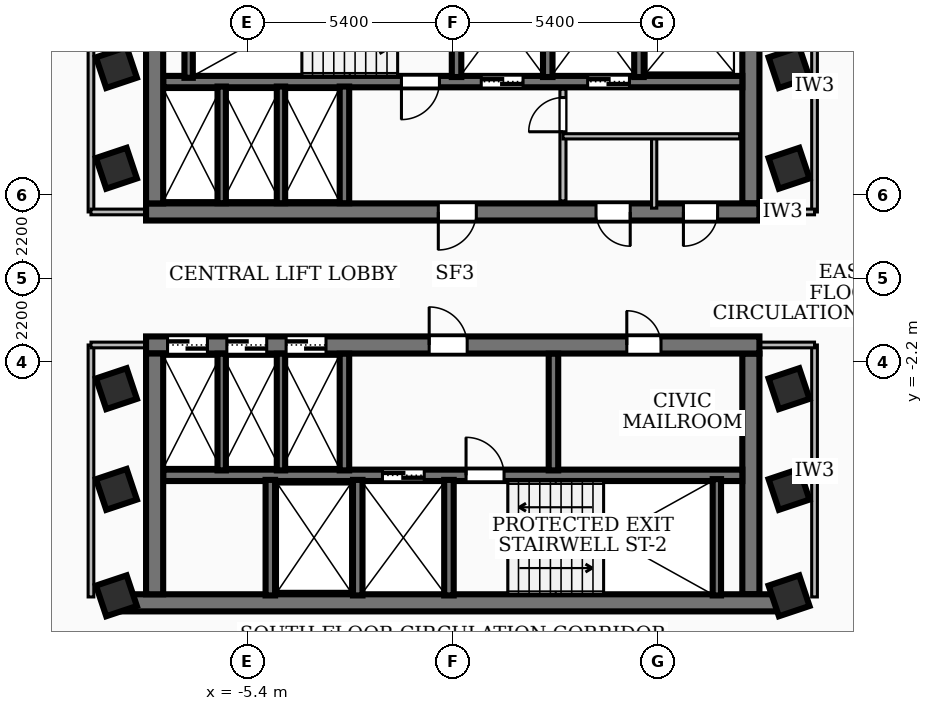
"""IFC4 building model, lengths in metres.
Left out: names, types, materials, properties, quantities, classifications, styles, units other than length and angle.
Written with IfcOpenShell. Run it as: python <this file> out.ifc"""

import sys

from ifc_helpers import new_model, si_unit, direction, frame, frame_2d, origin, origin_2d, place, context, subcontext, project, spatial, rectangle, extrude, element, fill, save


model = new_model("IFC4")
c1 = context("Model", 3, precision=1e-05, world=origin(), true_north=direction((0.0, 1.0)))
c2 = subcontext(c1, "Body", "Model", "MODEL_VIEW")
j1 = project(units=[si_unit("LENGTHUNIT", "METRE"), si_unit("PLANEANGLEUNIT", "RADIAN")], contexts=[c1])
p1 = place(None, origin())
s1 = spatial("IfcSite", under=j1, at=p1, CompositionType="ELEMENT")
p2 = place(p1, origin())
s2 = spatial("IfcBuilding", under=s1, at=p2, CompositionType="ELEMENT")
p3 = place(p2, frame((0.0, 0.0, 163.08)))
s3 = spatial("IfcBuildingStorey", under=s2, at=p3, CompositionType="ELEMENT", Elevation=163.08)
p4 = place(p3, frame((8.07, 1.75, 0.0), z_axis=(0.0, 0.0, 1.0), x_axis=(-1.0, 0.0, 0.0)))
e1 = element("IfcWall", 1, at=p4, inside=s3, PredefinedType="SHEAR", context=c2, shape_type="SweptSolid", body=[
    extrude(rectangle(XDim=16.14, YDim=0.45, at=frame_2d((8.07, 0.0))), origin(), (0.0, 0.0, 1.0), 3.34),
])
p5 = place(p4, frame((7.45, 0.0, 0.0)))
e2 = element("IfcOpeningElement", 2, at=p5, cuts=e1, PredefinedType="OPENING", context=c2, shape_type="SweptSolid", body=[
    extrude(rectangle(XDim=1.0, YDim=2.1, at=frame_2d((0.5, 1.05))), frame((0.0, 0.235, 0.0), z_axis=(0.0, -1.0, 0.0), x_axis=(1.0, 0.0, 0.0)), (0.0, 0.0, 1.0), 0.47),
])
p6 = place(p4, frame((3.4, 0.0, 0.0)))
e3 = element("IfcOpeningElement", 3, at=p6, cuts=e1, PredefinedType="OPENING", context=c2, shape_type="SweptSolid", body=[
    extrude(rectangle(XDim=0.9, YDim=2.06, at=frame_2d((0.45, 1.03))), frame((0.0, 0.235, 0.0), z_axis=(0.0, -1.0, 0.0), x_axis=(1.0, 0.0, 0.0)), (0.0, 0.0, 1.0), 0.47),
])
p7 = place(p4, frame((1.1, 0.0, 0.0)))
e4 = element("IfcOpeningElement", 4, at=p7, cuts=e1, PredefinedType="OPENING", context=c2, shape_type="SweptSolid", body=[
    extrude(rectangle(XDim=0.9, YDim=2.06, at=frame_2d((0.45, 1.03))), frame((0.0, 0.235, 0.0), z_axis=(0.0, -1.0, 0.0), x_axis=(1.0, 0.0, 0.0)), (0.0, 0.0, 1.0), 0.47),
])
for number, where, z_axis, x_axis in (
    (5, (-7.845, 1.975, 0.0), (0.0, 0.0, 1.0), (0.0, 1.0, 0.0)),
    (6, (7.845, 8.31, 0.0), (0.0, 0.0, 1.0), (0.0, -1.0, 0.0)),
):
    element("IfcWall", number, at=place(p3, frame(where, z_axis=z_axis, x_axis=x_axis)), inside=s3, PredefinedType="SHEAR", context=c2, shape_type="SweptSolid", body=[
        extrude(rectangle(XDim=6.335, YDim=0.45, at=frame_2d((3.167, 0.0))), origin(), (0.0, 0.0, 1.0), 3.34),
    ])
p8 = place(p3, frame((7.62, 5.18, 0.0), z_axis=(0.0, 0.0, 1.0), x_axis=(-1.0, 0.0, 0.0)))
e7 = element("IfcWall", 7, at=p8, inside=s3, PredefinedType="SOLIDWALL", context=c2, shape_type="SweptSolid", body=[
    extrude(rectangle(XDim=15.24, YDim=0.3, at=frame_2d((7.62, 0.0))), origin(), (0.0, 0.0, 1.0), 3.34),
])
p9 = place(p8, frame((5.77, 0.0, 0.0)))
e8 = element("IfcOpeningElement", 8, at=p9, cuts=e7, PredefinedType="OPENING", context=c2, shape_type="SweptSolid", body=[
    extrude(rectangle(XDim=1.1, YDim=2.15, at=frame_2d((0.55, 1.075))), frame((0.0, 0.16, 0.0), z_axis=(0.0, -1.0, 0.0), x_axis=(1.0, 0.0, 0.0)), (0.0, 0.0, 1.0), 0.32),
])
p10 = place(p8, frame((2.97, 0.0, 0.0)))
e9 = element("IfcOpeningElement", 9, at=p10, cuts=e7, PredefinedType="OPENING", context=c2, shape_type="SweptSolid", body=[
    extrude(rectangle(XDim=1.1, YDim=2.15, at=frame_2d((0.55, 1.075))), frame((0.0, 0.16, 0.0), z_axis=(0.0, -1.0, 0.0), x_axis=(1.0, 0.0, 0.0)), (0.0, 0.0, 1.0), 0.32),
])
p11 = place(p8, frame((7.97, 0.0, 0.0)))
e10 = element("IfcOpeningElement", 10, at=p11, cuts=e7, PredefinedType="OPENING", context=c2, shape_type="SweptSolid", body=[
    extrude(rectangle(XDim=1.0, YDim=2.1, at=frame_2d((0.5, 1.05))), frame((0.0, 0.16, 0.0), z_axis=(0.0, -1.0, 0.0), x_axis=(1.0, 0.0, 0.0)), (0.0, 0.0, 1.0), 0.32),
])
p12 = place(p3, frame((8.78, -8.535, 0.0), z_axis=(0.0, 0.0, 1.0), x_axis=(-1.0, 0.0, 0.0)))
e11 = element("IfcWall", 11, at=p12, inside=s3, PredefinedType="SHEAR", context=c2, shape_type="SweptSolid", body=[
    extrude(rectangle(XDim=17.56, YDim=0.45, at=frame_2d((8.78, 0.0))), origin(), (0.0, 0.0, 1.0), 3.34),
])
p13 = place(p3, frame((-8.07, -1.75, 0.0), z_axis=(0.0, 0.0, 1.0), x_axis=(1.0, 0.0, 0.0)))
e12 = element("IfcWall", 12, at=p13, inside=s3, PredefinedType="SHEAR", context=c2, shape_type="SweptSolid", body=[
    extrude(rectangle(XDim=16.14, YDim=0.45, at=frame_2d((8.07, 0.0))), origin(), (0.0, 0.0, 1.0), 3.34),
])
p14 = place(p13, frame((7.45, 0.0, 0.0)))
e13 = element("IfcOpeningElement", 13, at=p14, cuts=e12, PredefinedType="OPENING", context=c2, shape_type="SweptSolid", body=[
    extrude(rectangle(XDim=1.0, YDim=2.1, at=frame_2d((0.5, 1.05))), frame((0.0, 0.235, 0.0), z_axis=(0.0, -1.0, 0.0), x_axis=(1.0, 0.0, 0.0)), (0.0, 0.0, 1.0), 0.47),
])
p15 = place(p13, frame((12.65, 0.0, 0.0)))
e14 = element("IfcOpeningElement", 14, at=p15, cuts=e12, PredefinedType="OPENING", context=c2, shape_type="SweptSolid", body=[
    extrude(rectangle(XDim=0.9, YDim=2.06, at=frame_2d((0.45, 1.03))), frame((0.0, 0.235, 0.0), z_axis=(0.0, -1.0, 0.0), x_axis=(1.0, 0.0, 0.0)), (0.0, 0.0, 1.0), 0.47),
])
p16 = place(p13, frame((0.565, 0.0, 0.0)))
e15 = element("IfcOpeningElement", 15, at=p16, cuts=e12, PredefinedType="OPENING", context=c2, shape_type="SweptSolid", body=[
    extrude(rectangle(XDim=1.05, YDim=2.15, at=frame_2d((0.525, 1.075))), frame((0.0, 0.235, 0.0), z_axis=(0.0, -1.0, 0.0), x_axis=(1.0, 0.0, 0.0)), (0.0, 0.0, 1.0), 0.47),
])
p17 = place(p13, frame((2.125, 0.0, 0.0)))
e16 = element("IfcOpeningElement", 16, at=p17, cuts=e12, PredefinedType="OPENING", context=c2, shape_type="SweptSolid", body=[
    extrude(rectangle(XDim=1.05, YDim=2.15, at=frame_2d((0.525, 1.075))), frame((0.0, 0.235, 0.0), z_axis=(0.0, -1.0, 0.0), x_axis=(1.0, 0.0, 0.0)), (0.0, 0.0, 1.0), 0.47),
])
p18 = place(p13, frame((3.685, 0.0, 0.0)))
e17 = element("IfcOpeningElement", 17, at=p18, cuts=e12, PredefinedType="OPENING", context=c2, shape_type="SweptSolid", body=[
    extrude(rectangle(XDim=1.05, YDim=2.15, at=frame_2d((0.525, 1.075))), frame((0.0, 0.235, 0.0), z_axis=(0.0, -1.0, 0.0), x_axis=(1.0, 0.0, 0.0)), (0.0, 0.0, 1.0), 0.47),
])
for number, where, z_axis, x_axis in (
    (18, (-7.845, -8.31, 0.0), (0.0, 0.0, 1.0), (0.0, 1.0, 0.0)),
    (19, (7.845, -1.975, 0.0), (0.0, 0.0, 1.0), (0.0, -1.0, 0.0)),
):
    element("IfcWall", number, at=place(p3, frame(where, z_axis=z_axis, x_axis=x_axis)), inside=s3, PredefinedType="SHEAR", context=c2, shape_type="SweptSolid", body=[
        extrude(rectangle(XDim=6.335, YDim=0.45, at=frame_2d((3.167, 0.0))), origin(), (0.0, 0.0, 1.0), 3.34),
    ])
p19 = place(p3, frame((-7.62, -5.18, 0.0), z_axis=(0.0, 0.0, 1.0), x_axis=(1.0, 0.0, 0.0)))
e20 = element("IfcWall", 20, at=p19, inside=s3, PredefinedType="SOLIDWALL", context=c2, shape_type="SweptSolid", body=[
    extrude(rectangle(XDim=15.24, YDim=0.3, at=frame_2d((7.62, 0.0))), origin(), (0.0, 0.0, 1.0), 3.34),
])
p20 = place(p19, frame((5.77, 0.0, 0.0)))
e21 = element("IfcOpeningElement", 21, at=p20, cuts=e20, PredefinedType="OPENING", context=c2, shape_type="SweptSolid", body=[
    extrude(rectangle(XDim=1.1, YDim=2.15, at=frame_2d((0.55, 1.075))), frame((0.0, 0.16, 0.0), z_axis=(0.0, -1.0, 0.0), x_axis=(1.0, 0.0, 0.0)), (0.0, 0.0, 1.0), 0.32),
])
p21 = place(p19, frame((7.97, 0.0, 0.0)))
e22 = element("IfcOpeningElement", 22, at=p21, cuts=e20, PredefinedType="OPENING", context=c2, shape_type="SweptSolid", body=[
    extrude(rectangle(XDim=1.0, YDim=2.1, at=frame_2d((0.5, 1.05))), frame((0.0, 0.16, 0.0), z_axis=(0.0, -1.0, 0.0), x_axis=(1.0, 0.0, 0.0)), (0.0, 0.0, 1.0), 0.32),
])
for number, where, z_axis, x_axis in (
    (23, (-6.95, 5.28, 0.0), (0.0, 0.0, 1.0), (0.0, 1.0, 0.0)),
    (24, (6.95, -8.34, 0.0), (0.0, 0.0, 1.0), (0.0, 1.0, 0.0)),
):
    element("IfcWall", number, at=place(p3, frame(where, z_axis=z_axis, x_axis=x_axis)), inside=s3, PredefinedType="SOLIDWALL", context=c2, shape_type="SweptSolid", body=[
        extrude(rectangle(XDim=3.06, YDim=0.22, at=frame_2d((1.53, 0.0))), origin(), (0.0, 0.0, 1.0), 3.34),
    ])
for number, where, z_axis, x_axis in (
    (25, (0.1, 5.3, 0.0), (0.0, 0.0, 1.0), (0.0, 1.0, 0.0)),
    (26, (2.5, 5.3, 0.0), (0.0, 0.0, 1.0), (0.0, 1.0, 0.0)),
    (27, (4.9, 5.3, 0.0), (0.0, 0.0, 1.0), (0.0, 1.0, 0.0)),
):
    element("IfcWall", number, at=place(p3, frame(where, z_axis=z_axis, x_axis=x_axis)), inside=s3, PredefinedType="SOLIDWALL", context=c2, shape_type="SweptSolid", body=[
        extrude(rectangle(XDim=3.04, YDim=0.25, at=frame_2d((1.52, 0.0))), origin(), (0.0, 0.0, 1.0), 3.34),
    ])
p22 = place(p3, frame((-2.85, 1.98, 0.0), z_axis=(0.0, 0.0, 1.0), x_axis=(0.0, 1.0, 0.0)))
e28 = element("IfcWall", 28, at=p22, inside=s3, PredefinedType="SOLIDWALL", context=c2, shape_type="SweptSolid", body=[
    extrude(rectangle(XDim=3.07, YDim=0.25, at=frame_2d((1.535, 0.0))), origin(), (0.0, 0.0, 1.0), 3.34),
])
for number, where, z_axis, x_axis in (
    (29, (-0.1, -8.34, 0.0), (0.0, 0.0, 1.0), (0.0, 1.0, 0.0)),
    (30, (-2.5, -8.34, 0.0), (0.0, 0.0, 1.0), (0.0, 1.0, 0.0)),
    (31, (-4.8, -8.34, 0.0), (0.0, 0.0, 1.0), (0.0, 1.0, 0.0)),
):
    element("IfcWall", number, at=place(p3, frame(where, z_axis=z_axis, x_axis=x_axis)), inside=s3, PredefinedType="SOLIDWALL", context=c2, shape_type="SweptSolid", body=[
        extrude(rectangle(XDim=3.04, YDim=0.25, at=frame_2d((1.52, 0.0))), origin(), (0.0, 0.0, 1.0), 3.34),
    ])
for number, where, z_axis, x_axis in (
    (32, (-2.85, -5.05, 0.0), (0.0, 0.0, 1.0), (0.0, 1.0, 0.0)),
    (33, (2.65, -5.05, 0.0), (0.0, 0.0, 1.0), (0.0, 1.0, 0.0)),
):
    element("IfcWall", number, at=place(p3, frame(where, z_axis=z_axis, x_axis=x_axis)), inside=s3, PredefinedType="SOLIDWALL", context=c2, shape_type="SweptSolid", body=[
        extrude(rectangle(XDim=3.07, YDim=0.25, at=frame_2d((1.535, 0.0))), origin(), (0.0, 0.0, 1.0), 3.34),
    ])
for number, where, z_axis, x_axis in (
    (34, (-6.08, 1.98, 0.0), (0.0, 0.0, 1.0), (0.0, 1.0, 0.0)),
    (35, (-4.52, 1.98, 0.0), (0.0, 0.0, 1.0), (0.0, 1.0, 0.0)),
    (36, (-6.08, -5.05, 0.0), (0.0, 0.0, 1.0), (0.0, 1.0, 0.0)),
    (37, (-4.52, -5.05, 0.0), (0.0, 0.0, 1.0), (0.0, 1.0, 0.0)),
):
    element("IfcWall", number, at=place(p3, frame(where, z_axis=z_axis, x_axis=x_axis)), inside=s3, PredefinedType="SOLIDWALL", context=c2, shape_type="SweptSolid", body=[
        extrude(rectangle(XDim=3.07, YDim=0.22, at=frame_2d((1.535, 0.0))), origin(), (0.0, 0.0, 1.0), 3.34),
    ])
for number, where, z_axis, x_axis in (
    (38, (-8.85, -5.55, 0.0), (0.0, 0.0, 1.0), (0.948, 0.317, 0.0)),
    (39, (-8.85, -2.9, 0.0), (0.0, 0.0, 1.0), (0.948, 0.317, 0.0)),
    (40, (-8.85, 2.9, 0.0), (0.0, 0.0, 1.0), (0.948, 0.317, 0.0)),
    (41, (-8.85, 5.55, 0.0), (0.0, 0.0, 1.0), (0.948, 0.317, 0.0)),
    (42, (8.85, -5.55, 0.0), (0.0, 0.0, 1.0), (0.948, 0.317, 0.0)),
    (43, (8.85, -2.9, 0.0), (0.0, 0.0, 1.0), (0.948, 0.317, 0.0)),
    (44, (8.85, 2.9, 0.0), (0.0, 0.0, 1.0), (0.948, 0.317, 0.0)),
    (45, (8.85, 5.55, 0.0), (0.0, 0.0, 1.0), (0.948, 0.317, 0.0)),
    (46, (8.85, -8.35, 0.0), (0.0, 0.0, 1.0), (0.948, 0.317, 0.0)),
    (47, (-8.85, -8.35, 0.0), (0.0, 0.0, 1.0), (0.948, 0.317, 0.0)),
):
    element("IfcColumn", number, at=place(p3, frame(where, z_axis=z_axis, x_axis=x_axis)), inside=s3, PredefinedType="COLUMN", context=c2, shape_type="SweptSolid", body=[
        extrude(rectangle(XDim=0.85, YDim=0.85, at=origin_2d()), origin(), (0.0, 0.0, 1.0), 3.6),
    ])
p23 = place(p3, frame((2.9, 2.04, 0.0), z_axis=(0.0, 0.0, 1.0), x_axis=(0.0, 1.0, 0.0)))
e48 = element("IfcWall", 48, at=p23, inside=s3, PredefinedType="PARTITIONING", context=c2, shape_type="SweptSolid", body=[
    extrude(rectangle(XDim=2.94, YDim=0.16, at=frame_2d((1.47, 0.0))), origin(), (0.0, 0.0, 1.0), 2.57),
])
p24 = place(p23, frame((1.82, 0.0, 0.0)))
e49 = element("IfcOpeningElement", 49, at=p24, cuts=e48, PredefinedType="OPENING", context=c2, shape_type="SweptSolid", body=[
    extrude(rectangle(XDim=0.9, YDim=2.06, at=frame_2d((0.45, 1.03))), frame((0.0, 0.09, 0.0), z_axis=(0.0, -1.0, 0.0), x_axis=(1.0, 0.0, 0.0)), (0.0, 0.0, 1.0), 0.18),
])
p25 = place(p3, frame((2.9, 3.74, 0.0), z_axis=(0.0, 0.0, 1.0), x_axis=(1.0, 0.0, 0.0)))
e50 = element("IfcWall", 50, at=p25, inside=s3, PredefinedType="PARTITIONING", context=c2, shape_type="SweptSolid", body=[
    extrude(rectangle(XDim=4.65, YDim=0.138, at=frame_2d((2.325, 0.0))), origin(), (0.0, 0.0, 1.0), 3.34),
])
p26 = place(p3, frame((5.3, 1.85, 0.0), z_axis=(0.0, 0.0, 1.0), x_axis=(0.0, 1.0, 0.0)))
e51 = element("IfcWall", 51, at=p26, inside=s3, PredefinedType="PARTITIONING", context=c2, shape_type="SweptSolid", body=[
    extrude(rectangle(XDim=1.89, YDim=0.138, at=frame_2d((0.945, 0.0))), origin(), (0.0, 0.0, 1.0), 2.57),
])
p27 = place(p3, frame((-9.52, 1.75, 0.0), z_axis=(0.0, 0.0, 1.0), x_axis=(0.0, 1.0, 0.0)))
e52 = element("IfcWall", 52, at=p27, inside=s3, PredefinedType="PARTITIONING", context=c2, shape_type="SweptSolid", body=[
    extrude(rectangle(XDim=6.63, YDim=0.15, at=frame_2d((3.315, 0.0))), origin(), (0.0, 0.0, 1.0), 3.34),
])
p28 = place(p3, frame((-7.85, 1.75, 0.0), z_axis=(0.0, 0.0, 1.0), x_axis=(-1.0, 0.0, 0.0)))
e53 = element("IfcWall", 53, at=p28, inside=s3, PredefinedType="PARTITIONING", context=c2, shape_type="SweptSolid", body=[
    extrude(rectangle(XDim=1.67, YDim=0.15, at=frame_2d((0.835, 0.0))), origin(), (0.0, 0.0, 1.0), 2.57),
])
p29 = place(p3, frame((-9.52, -8.38, 0.0), z_axis=(0.0, 0.0, 1.0), x_axis=(0.0, 1.0, 0.0)))
e54 = element("IfcWall", 54, at=p29, inside=s3, PredefinedType="PARTITIONING", context=c2, shape_type="SweptSolid", body=[
    extrude(rectangle(XDim=6.63, YDim=0.15, at=frame_2d((3.315, 0.0))), origin(), (0.0, 0.0, 1.0), 2.644),
])
p30 = place(p3, frame((-7.85, -1.75, 0.0), z_axis=(0.0, 0.0, 1.0), x_axis=(-1.0, 0.0, 0.0)))
e55 = element("IfcWall", 55, at=p30, inside=s3, PredefinedType="PARTITIONING", context=c2, shape_type="SweptSolid", body=[
    extrude(rectangle(XDim=1.67, YDim=0.15, at=frame_2d((0.835, 0.0))), origin(), (0.0, 0.0, 1.0), 2.57),
])
p31 = place(p3, frame((9.52, 1.75, 0.0), z_axis=(0.0, 0.0, 1.0), x_axis=(0.0, 1.0, 0.0)))
e56 = element("IfcWall", 56, at=p31, inside=s3, PredefinedType="PARTITIONING", context=c2, shape_type="SweptSolid", body=[
    extrude(rectangle(XDim=6.63, YDim=0.15, at=frame_2d((3.315, 0.0))), origin(), (0.0, 0.0, 1.0), 2.644),
])
p32 = place(p3, frame((7.85, 1.75, 0.0), z_axis=(0.0, 0.0, 1.0), x_axis=(1.0, 0.0, 0.0)))
e57 = element("IfcWall", 57, at=p32, inside=s3, PredefinedType="PARTITIONING", context=c2, shape_type="SweptSolid", body=[
    extrude(rectangle(XDim=1.67, YDim=0.15, at=frame_2d((0.835, 0.0))), origin(), (0.0, 0.0, 1.0), 2.57),
])
p33 = place(p3, frame((9.52, -8.38, 0.0), z_axis=(0.0, 0.0, 1.0), x_axis=(0.0, 1.0, 0.0)))
e58 = element("IfcWall", 58, at=p33, inside=s3, PredefinedType="PARTITIONING", context=c2, shape_type="SweptSolid", body=[
    extrude(rectangle(XDim=6.63, YDim=0.15, at=frame_2d((3.315, 0.0))), origin(), (0.0, 0.0, 1.0), 3.34),
])
p34 = place(p3, frame((7.85, -1.75, 0.0), z_axis=(0.0, 0.0, 1.0), x_axis=(1.0, 0.0, 0.0)))
e59 = element("IfcWall", 59, at=p34, inside=s3, PredefinedType="PARTITIONING", context=c2, shape_type="SweptSolid", body=[
    extrude(rectangle(XDim=1.67, YDim=0.15, at=frame_2d((0.835, 0.0))), origin(), (0.0, 0.0, 1.0), 2.57),
])
p35 = place(p3, frame((10.372, 14.037, 0.0), z_axis=(0.0, 0.0, 1.0), x_axis=(0.317298382655, -0.94832575435, 0.0)))
e60 = element("IfcWall", 60, at=p35, inside=s3, PredefinedType="PARTITIONING", context=c2, shape_type="SweptSolid", body=[
    extrude(rectangle(XDim=20.041, YDim=0.145, at=frame_2d((10.021, 0.0))), origin(), (0.0, 0.0, 1.0), 2.644),
])
p36 = place(p35, frame((9.42, 0.0, 0.0)))
e61 = element("IfcOpeningElement", 61, at=p36, cuts=e60, PredefinedType="OPENING", context=c2, shape_type="SweptSolid", body=[
    extrude(rectangle(XDim=1.2, YDim=2.1, at=frame_2d((0.6, 1.05))), frame((0.0, 0.083, 0.0), z_axis=(0.0, -1.0, 0.0), x_axis=(1.0, 0.0, 0.0)), (0.0, 0.0, 1.0), 0.165),
])
p37 = place(p3, frame((-10.372, -14.037, 0.0), z_axis=(0.0, 0.0, 1.0), x_axis=(-0.317298382655, 0.94832575435, 0.0)))
e62 = element("IfcWall", 62, at=p37, inside=s3, PredefinedType="PARTITIONING", context=c2, shape_type="SweptSolid", body=[
    extrude(rectangle(XDim=20.041, YDim=0.145, at=frame_2d((10.021, 0.0))), origin(), (0.0, 0.0, 1.0), 2.644),
])
p38 = place(p37, frame((9.42, 0.0, 0.0)))
e63 = element("IfcOpeningElement", 63, at=p38, cuts=e62, PredefinedType="OPENING", context=c2, shape_type="SweptSolid", body=[
    extrude(rectangle(XDim=1.2, YDim=2.1, at=frame_2d((0.6, 1.05))), frame((0.0, 0.083, 0.0), z_axis=(0.0, -1.0, 0.0), x_axis=(1.0, 0.0, 0.0)), (0.0, 0.0, 1.0), 0.165),
])
p39 = place(p5, origin())
e64 = element("IfcDoor", 64, at=p39, inside=s3, OperationType="SINGLE_SWING_RIGHT", PredefinedType="DOOR", context=c2, shape_type="SweptSolid", body=[
    extrude(rectangle(XDim=1.0, YDim=2.1, at=frame_2d((0.5, 1.05))), frame((0.0, 0.025, 0.0), z_axis=(0.0, -1.0, 0.0), x_axis=(1.0, 0.0, 0.0)), (0.0, 0.0, 1.0), 0.05),
])
fill(e2, e64)
p40 = place(p14, origin())
e65 = element("IfcDoor", 65, at=p40, inside=s3, OperationType="SINGLE_SWING_LEFT", PredefinedType="DOOR", context=c2, shape_type="SweptSolid", body=[
    extrude(rectangle(XDim=1.0, YDim=2.1, at=frame_2d((0.5, 1.05))), frame((0.0, 0.025, 0.0), z_axis=(0.0, -1.0, 0.0), x_axis=(1.0, 0.0, 0.0)), (0.0, 0.0, 1.0), 0.05),
])
fill(e13, e65)
p41 = place(p9, origin())
e66 = element("IfcDoor", 66, at=p41, inside=s3, OperationType="DOUBLE_DOOR_SLIDING", PredefinedType="DOOR", context=c2, shape_type="SweptSolid", body=[
    extrude(rectangle(XDim=1.1, YDim=2.15, at=frame_2d((0.55, 1.075))), frame((0.0, 0.025, 0.0), z_axis=(0.0, -1.0, 0.0), x_axis=(1.0, 0.0, 0.0)), (0.0, 0.0, 1.0), 0.05),
])
fill(e8, e66)
p42 = place(p10, origin())
e67 = element("IfcDoor", 67, at=p42, inside=s3, OperationType="DOUBLE_DOOR_SLIDING", PredefinedType="DOOR", context=c2, shape_type="SweptSolid", body=[
    extrude(rectangle(XDim=1.1, YDim=2.15, at=frame_2d((0.55, 1.075))), frame((0.0, 0.025, 0.0), z_axis=(0.0, -1.0, 0.0), x_axis=(1.0, 0.0, 0.0)), (0.0, 0.0, 1.0), 0.05),
])
fill(e9, e67)
p43 = place(p11, origin())
e68 = element("IfcDoor", 68, at=p43, inside=s3, OperationType="SINGLE_SWING_RIGHT", PredefinedType="DOOR", context=c2, shape_type="SweptSolid", body=[
    extrude(rectangle(XDim=1.0, YDim=2.1, at=frame_2d((0.5, 1.05))), frame((0.0, 0.025, 0.0), z_axis=(0.0, -1.0, 0.0), x_axis=(1.0, 0.0, 0.0)), (0.0, 0.0, 1.0), 0.05),
])
fill(e10, e68)
p44 = place(p20, origin())
e69 = element("IfcDoor", 69, at=p44, inside=s3, OperationType="DOUBLE_DOOR_SLIDING", PredefinedType="DOOR", context=c2, shape_type="SweptSolid", body=[
    extrude(rectangle(XDim=1.1, YDim=2.15, at=frame_2d((0.55, 1.075))), frame((0.0, 0.025, 0.0), z_axis=(0.0, -1.0, 0.0), x_axis=(1.0, 0.0, 0.0)), (0.0, 0.0, 1.0), 0.05),
])
fill(e21, e69)
p45 = place(p21, origin())
e70 = element("IfcDoor", 70, at=p45, inside=s3, OperationType="SINGLE_SWING_LEFT", PredefinedType="DOOR", context=c2, shape_type="SweptSolid", body=[
    extrude(rectangle(XDim=1.0, YDim=2.1, at=frame_2d((0.5, 1.05))), frame((0.0, 0.025, 0.0), z_axis=(0.0, -1.0, 0.0), x_axis=(1.0, 0.0, 0.0)), (0.0, 0.0, 1.0), 0.05),
])
fill(e22, e70)
p46 = place(p15, origin())
e71 = element("IfcDoor", 71, at=p46, inside=s3, OperationType="SINGLE_SWING_LEFT", PredefinedType="DOOR", context=c2, shape_type="SweptSolid", body=[
    extrude(rectangle(XDim=0.9, YDim=2.06, at=frame_2d((0.45, 1.03))), frame((0.0, 0.025, 0.0), z_axis=(0.0, -1.0, 0.0), x_axis=(1.0, 0.0, 0.0)), (0.0, 0.0, 1.0), 0.05),
])
fill(e14, e71)
p47 = place(p16, origin())
e72 = element("IfcDoor", 72, at=p47, inside=s3, OperationType="DOUBLE_DOOR_SLIDING", PredefinedType="DOOR", context=c2, shape_type="SweptSolid", body=[
    extrude(rectangle(XDim=1.05, YDim=2.15, at=frame_2d((0.525, 1.075))), frame((0.0, 0.025, 0.0), z_axis=(0.0, -1.0, 0.0), x_axis=(1.0, 0.0, 0.0)), (0.0, 0.0, 1.0), 0.05),
])
fill(e15, e72)
p48 = place(p17, origin())
e73 = element("IfcDoor", 73, at=p48, inside=s3, OperationType="DOUBLE_DOOR_SLIDING", PredefinedType="DOOR", context=c2, shape_type="SweptSolid", body=[
    extrude(rectangle(XDim=1.05, YDim=2.15, at=frame_2d((0.525, 1.075))), frame((0.0, 0.025, 0.0), z_axis=(0.0, -1.0, 0.0), x_axis=(1.0, 0.0, 0.0)), (0.0, 0.0, 1.0), 0.05),
])
fill(e16, e73)
p49 = place(p18, origin())
e74 = element("IfcDoor", 74, at=p49, inside=s3, OperationType="DOUBLE_DOOR_SLIDING", PredefinedType="DOOR", context=c2, shape_type="SweptSolid", body=[
    extrude(rectangle(XDim=1.05, YDim=2.15, at=frame_2d((0.525, 1.075))), frame((0.0, 0.025, 0.0), z_axis=(0.0, -1.0, 0.0), x_axis=(1.0, 0.0, 0.0)), (0.0, 0.0, 1.0), 0.05),
])
fill(e17, e74)
p50 = place(p6, origin())
e75 = element("IfcDoor", 75, at=p50, inside=s3, OperationType="SINGLE_SWING_LEFT", PredefinedType="DOOR", context=c2, shape_type="SweptSolid", body=[
    extrude(rectangle(XDim=0.9, YDim=2.06, at=frame_2d((0.45, 1.03))), frame((0.0, 0.025, 0.0), z_axis=(0.0, -1.0, 0.0), x_axis=(1.0, 0.0, 0.0)), (0.0, 0.0, 1.0), 0.05),
])
fill(e3, e75)
p51 = place(p7, origin())
e76 = element("IfcDoor", 76, at=p51, inside=s3, OperationType="SINGLE_SWING_RIGHT", PredefinedType="DOOR", context=c2, shape_type="SweptSolid", body=[
    extrude(rectangle(XDim=0.9, YDim=2.06, at=frame_2d((0.45, 1.03))), frame((0.0, 0.025, 0.0), z_axis=(0.0, -1.0, 0.0), x_axis=(1.0, 0.0, 0.0)), (0.0, 0.0, 1.0), 0.05),
])
fill(e4, e76)
p52 = place(p24, origin())
e77 = element("IfcDoor", 77, at=p52, inside=s3, OperationType="SINGLE_SWING_LEFT", PredefinedType="DOOR", context=c2, shape_type="SweptSolid", body=[
    extrude(rectangle(XDim=0.9, YDim=2.06, at=frame_2d((0.45, 1.03))), frame((0.0, 0.025, 0.0), z_axis=(0.0, -1.0, 0.0), x_axis=(1.0, 0.0, 0.0)), (0.0, 0.0, 1.0), 0.05),
])
fill(e49, e77)
save(model, sys.argv[1])
